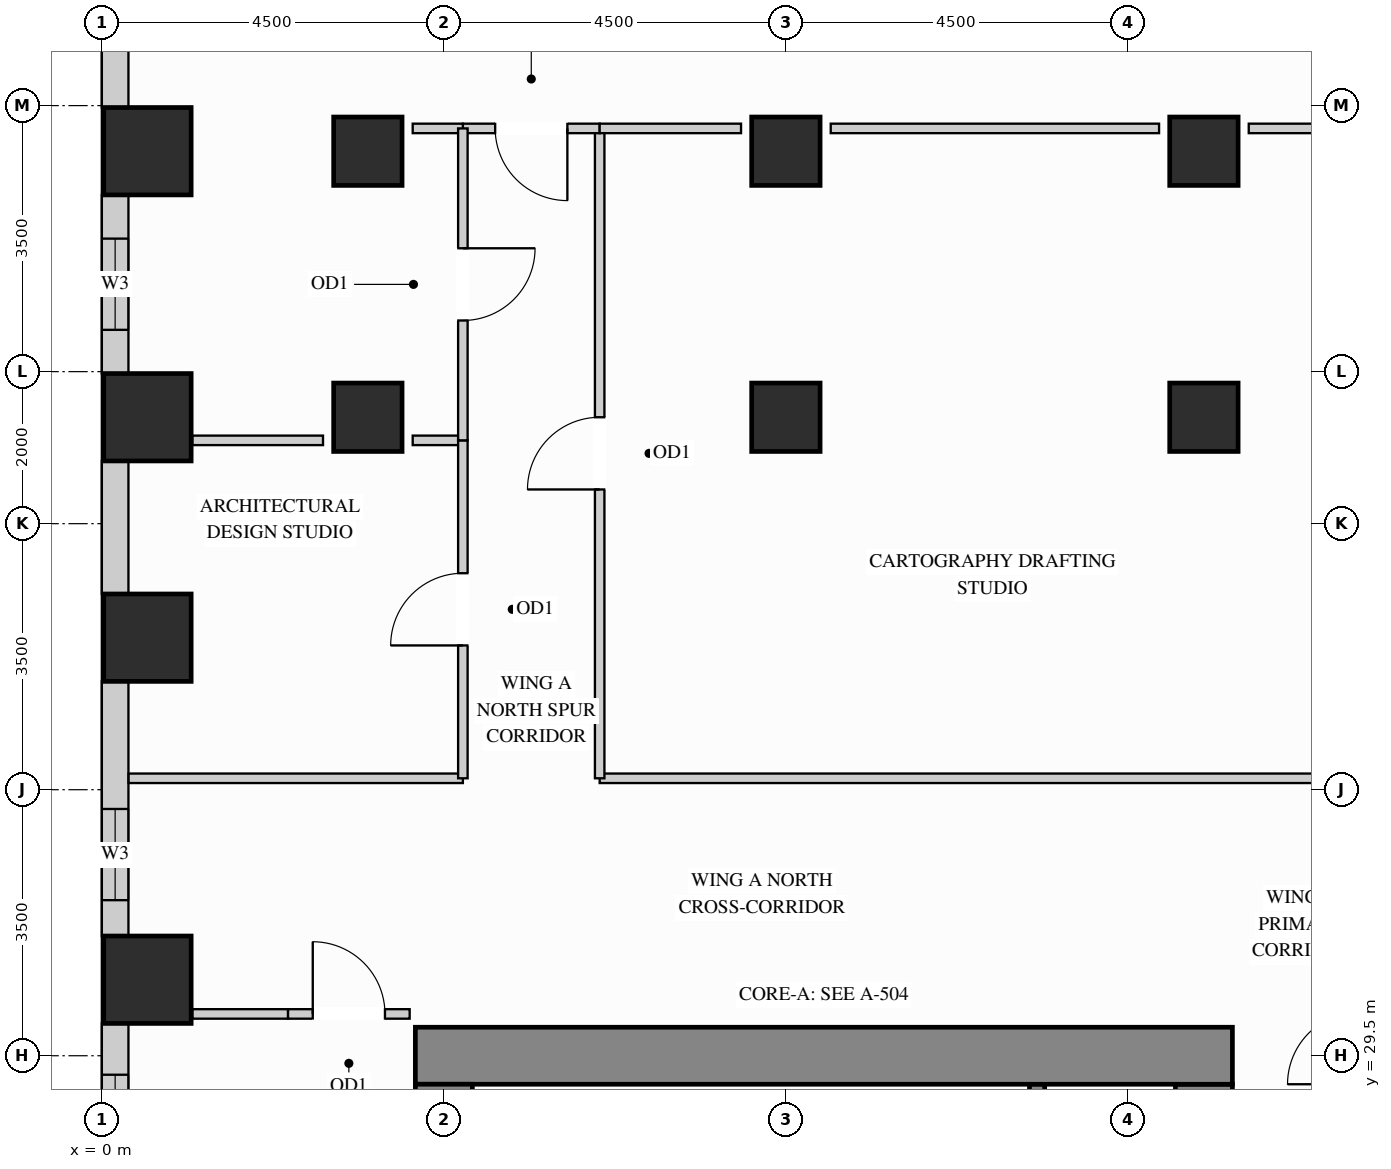
"""IFC4 building model, lengths in metres.
Left out: names, types, materials, properties, quantities, classifications, styles, units other than length and angle.
Written with IfcOpenShell. Run it as: python <this file> out.ifc"""

import sys

from ifc_helpers import new_model, si_unit, direction, frame, frame_2d, origin, origin_2d, place, context, subcontext, project, spatial, rectangle, extrude, source, transform, mapped, element, fill, save


model = new_model("IFC4")
c1 = context("Model", 3, precision=1e-05, world=origin(), true_north=direction((0.0, 1.0)))
c2 = subcontext(c1, "Body", "Model", "MODEL_VIEW")
j1 = project(units=[si_unit("LENGTHUNIT", "METRE"), si_unit("PLANEANGLEUNIT", "RADIAN")], contexts=[c1])
p1 = place(None, origin())
s1 = spatial("IfcSite", under=j1, at=p1, CompositionType="ELEMENT")
p2 = place(p1, origin())
s2 = spatial("IfcBuilding", under=s1, at=p2, CompositionType="ELEMENT")
p3 = place(p2, frame((0.0, 0.0, 109.8)))
s3 = spatial("IfcBuildingStorey", under=s2, at=p3, CompositionType="ELEMENT", Elevation=109.8)
m1 = source(origin(), c2, "Body", "SweptSolid", [
    extrude(rectangle(XDim=0.9, YDim=0.9, at=origin_2d()), origin(), (0.0, 0.0, 1.0), 3.38),
])
for number, where, z_axis, x_axis in (
    (1, (14.5, 37.9, 0.0), (0.0, 0.0, 1.0), (1.0, 0.0, 0.0)),
    (2, (14.5, 41.4, 0.0), (0.0, 0.0, 1.0), (1.0, 0.0, 0.0)),
    (3, (3.5, 37.9, 0.0), (0.0, 0.0, 1.0), (1.0, 0.0, 0.0)),
    (4, (3.5, 41.4, 0.0), (0.0, 0.0, 1.0), (1.0, 0.0, 0.0)),
    (5, (9.0, 37.9, 0.0), (0.0, 0.0, 1.0), (1.0, 0.0, 0.0)),
    (6, (9.0, 41.4, 0.0), (0.0, 0.0, 1.0), (1.0, 0.0, 0.0)),
):
    element("IfcColumn", number, at=place(p3, frame(where, z_axis=z_axis, x_axis=x_axis)), inside=s3, PredefinedType="COLUMN", context=c2, shape_type="MappedRepresentation", body=[
        mapped(m1, transform((0.0, 0.0, 0.0), x_axis=(1.0, 0.0, 0.0), y_axis=(0.0, 1.0, 0.0), z_axis=(0.0, 0.0, 1.0))),
    ])
m2 = source(origin(), c2, "Body", "SweptSolid", [
    extrude(rectangle(XDim=1.15, YDim=1.15, at=origin_2d()), origin(), (0.0, 0.0, 1.0), 3.38),
])
for number, where, z_axis, x_axis in (
    (7, (0.6, 30.5, 0.0), (0.0, 0.0, 1.0), (1.0, 0.0, 0.0)),
    (8, (0.6, 35.0, 0.0), (0.0, 0.0, 1.0), (1.0, 0.0, 0.0)),
    (9, (0.6, 37.9, 0.0), (0.0, 0.0, 1.0), (1.0, 0.0, 0.0)),
    (10, (0.6, 41.4, 0.0), (0.0, 0.0, 1.0), (1.0, 0.0, 0.0)),
):
    element("IfcColumn", number, at=place(p3, frame(where, z_axis=z_axis, x_axis=x_axis)), inside=s3, PredefinedType="COLUMN", context=c2, shape_type="MappedRepresentation", body=[
        mapped(m2, transform((0.0, 0.0, 0.0), x_axis=(1.0, 0.0, 0.0), y_axis=(0.0, 1.0, 0.0), z_axis=(0.0, 0.0, 1.0))),
    ])
m3 = source(origin(), c2, "Body", "SweptSolid", [
    extrude(rectangle(XDim=8.245, YDim=0.75, at=frame_2d((4.123, 0.0))), origin(), (0.0, 0.0, 1.0), 3.38),
])
p4 = place(p3, frame((14.5, 20.88, 0.0), z_axis=(0.0, 0.0, 1.0), x_axis=(0.0, 1.0, 0.0)))
e11 = element("IfcWall", 11, at=p4, inside=s3, PredefinedType="SHEAR", context=c2, shape_type="MappedRepresentation", body=[
    mapped(m3, transform((0.0, 0.0, 0.0), x_axis=(1.0, 0.0, 0.0), y_axis=(0.0, 1.0, 0.0), z_axis=(0.0, 0.0, 1.0))),
])
m4 = source(origin(), c2, "Body", "SweptSolid", [
    extrude(rectangle(XDim=10.75, YDim=0.75, at=frame_2d((5.375, 0.0))), origin(), (0.0, 0.0, 1.0), 3.38),
])
p5 = place(p3, frame((4.125, 29.5, 0.0), z_axis=(0.0, 0.0, 1.0), x_axis=(1.0, 0.0, 0.0)))
e12 = element("IfcWall", 12, at=p5, inside=s3, PredefinedType="SHEAR", context=c2, shape_type="MappedRepresentation", body=[
    mapped(m4, transform((0.0, 0.0, 0.0), x_axis=(1.0, 0.0, 0.0), y_axis=(0.0, 1.0, 0.0), z_axis=(0.0, 0.0, 1.0))),
])
m5 = source(origin(), c2, "Body", "SweptSolid", [
    extrude(rectangle(XDim=20.25, YDim=0.75, at=frame_2d((10.125, 0.0))), origin(), (0.0, 0.0, 1.0), 3.38),
])
p6 = place(p3, frame((4.5, 8.875, 0.0), z_axis=(0.0, 0.0, 1.0), x_axis=(0.0, 1.0, 0.0)))
e13 = element("IfcWall", 13, at=p6, inside=s3, PredefinedType="SHEAR", context=c2, shape_type="MappedRepresentation", body=[
    mapped(m5, transform((0.0, 0.0, 0.0), x_axis=(1.0, 0.0, 0.0), y_axis=(0.0, 1.0, 0.0), z_axis=(0.0, 0.0, 1.0))),
])
m6 = source(origin(), c2, "Body", "SweptSolid", [
    extrude(rectangle(XDim=1.179, YDim=0.35, at=frame_2d((0.59, 0.0))), origin(), (0.0, 0.0, 1.0), 3.365),
])
p7 = place(p3, frame((0.175, 43.152, 0.0), z_axis=(0.0, 0.0, 1.0), x_axis=(0.0, -1.0, 0.0)))
e14 = element("IfcWall", 14, at=p7, inside=s3, PredefinedType="SOLIDWALL", context=c2, shape_type="MappedRepresentation", body=[
    mapped(m6, transform((0.0, 0.0, 0.0), x_axis=(1.0, 0.0, 0.0), y_axis=(0.0, 1.0, 0.0), z_axis=(0.0, 0.0, 1.0))),
])
p8 = place(p3, frame((0.175, 40.827, 0.0), z_axis=(0.0, 0.0, 1.0), x_axis=(0.0, -1.0, 0.0)))
e15 = element("IfcWall", 15, at=p8, inside=s3, PredefinedType="SOLIDWALL", context=c2, shape_type="SweptSolid", body=[
    extrude(rectangle(XDim=2.354, YDim=0.35, at=frame_2d((1.177, 0.0))), origin(), (0.0, 0.0, 1.0), 3.365),
])
p9 = place(p8, frame((0.577, 0.0, 0.78)))
e16 = element("IfcOpeningElement", 16, at=p9, cuts=e15, PredefinedType="OPENING", context=c2, shape_type="SweptSolid", body=[
    extrude(rectangle(XDim=1.2, YDim=2.1, at=frame_2d((0.6, 1.05))), frame((0.0, 0.185, 0.0), z_axis=(0.0, -1.0, 0.0), x_axis=(1.0, 0.0, 0.0)), (0.0, 0.0, 1.0), 0.37),
])
m7 = source(origin(), c2, "Body", "SweptSolid", [
    extrude(rectangle(XDim=1.754, YDim=0.35, at=frame_2d((0.877, 0.0))), origin(), (0.0, 0.0, 1.0), 3.365),
])
p10 = place(p3, frame((0.175, 37.327, 0.0), z_axis=(0.0, 0.0, 1.0), x_axis=(0.0, -1.0, 0.0)))
e17 = element("IfcWall", 17, at=p10, inside=s3, PredefinedType="SOLIDWALL", context=c2, shape_type="MappedRepresentation", body=[
    mapped(m7, transform((0.0, 0.0, 0.0), x_axis=(1.0, 0.0, 0.0), y_axis=(0.0, 1.0, 0.0), z_axis=(0.0, 0.0, 1.0))),
])
p11 = place(p3, frame((0.175, 34.427, 0.0), z_axis=(0.0, 0.0, 1.0), x_axis=(0.0, -1.0, 0.0)))
e18 = element("IfcWall", 18, at=p11, inside=s3, PredefinedType="SOLIDWALL", context=c2, shape_type="SweptSolid", body=[
    extrude(rectangle(XDim=3.354, YDim=0.35, at=frame_2d((1.677, 0.0))), origin(), (0.0, 0.0, 1.0), 3.365),
])
p12 = place(p11, frame((1.68, 0.0, 0.78)))
e19 = element("IfcOpeningElement", 19, at=p12, cuts=e18, PredefinedType="OPENING", context=c2, shape_type="SweptSolid", body=[
    extrude(rectangle(XDim=1.2, YDim=2.1, at=frame_2d((0.6, 1.05))), frame((0.0, 0.185, 0.0), z_axis=(0.0, -1.0, 0.0), x_axis=(1.0, 0.0, 0.0)), (0.0, 0.0, 1.0), 0.37),
])
p13 = place(p3, frame((0.175, 29.927, 0.0), z_axis=(0.0, 0.0, 1.0), x_axis=(0.0, -1.0, 0.0)))
e20 = element("IfcWall", 20, at=p13, inside=s3, PredefinedType="SOLIDWALL", context=c2, shape_type="SweptSolid", body=[
    extrude(rectangle(XDim=2.554, YDim=0.35, at=frame_2d((1.277, 0.0))), origin(), (0.0, 0.0, 1.0), 3.365),
])
p14 = place(p13, frame((0.677, 0.0, 0.78)))
e21 = element("IfcOpeningElement", 21, at=p14, cuts=e20, PredefinedType="OPENING", context=c2, shape_type="SweptSolid", body=[
    extrude(rectangle(XDim=1.2, YDim=2.1, at=frame_2d((0.6, 1.05))), frame((0.0, 0.185, 0.0), z_axis=(0.0, -1.0, 0.0), x_axis=(1.0, 0.0, 0.0)), (0.0, 0.0, 1.0), 0.37),
])
m8 = source(origin(), c2, "Body", "SweptSolid", [
    extrude(rectangle(XDim=12.598, YDim=0.125, at=frame_2d((6.299, 0.0))), origin(), (0.0, 0.0, 1.0), 3.365),
])
p15 = place(p3, frame((6.55, 33.15, 0.0), z_axis=(0.0, 0.0, 1.0), x_axis=(1.0, 0.0, 0.0)))
e22 = element("IfcWall", 22, at=p15, inside=s3, PredefinedType="PARTITIONING", context=c2, shape_type="MappedRepresentation", body=[
    mapped(m8, transform((0.0, 0.0, 0.0), x_axis=(1.0, 0.0, 0.0), y_axis=(0.0, 1.0, 0.0), z_axis=(0.0, 0.0, 1.0))),
])
m9 = source(origin(), c2, "Body", "SweptSolid", [
    extrude(rectangle(XDim=4.398, YDim=0.125, at=frame_2d((2.199, 0.0))), origin(), (0.0, 0.0, 1.0), 3.365),
])
p16 = place(p3, frame((0.352, 33.15, 0.0), z_axis=(0.0, 0.0, 1.0), x_axis=(1.0, 0.0, 0.0)))
e23 = element("IfcWall", 23, at=p16, inside=s3, PredefinedType="PARTITIONING", context=c2, shape_type="MappedRepresentation", body=[
    mapped(m9, transform((0.0, 0.0, 0.0), x_axis=(1.0, 0.0, 0.0), y_axis=(0.0, 1.0, 0.0), z_axis=(0.0, 0.0, 1.0))),
])
m10 = source(origin(), c2, "Body", "SweptSolid", [
    extrude(rectangle(XDim=1.72, YDim=0.125, at=frame_2d((0.86, 0.0))), origin(), (0.0, 0.0, 1.0), 3.365),
])
p17 = place(p3, frame((1.19, 37.596, 0.0), z_axis=(0.0, 0.0, 1.0), x_axis=(1.0, 0.0, 0.0)))
e24 = element("IfcWall", 24, at=p17, inside=s3, PredefinedType="PARTITIONING", context=c2, shape_type="MappedRepresentation", body=[
    mapped(m10, transform((0.0, 0.0, 0.0), x_axis=(1.0, 0.0, 0.0), y_axis=(0.0, 1.0, 0.0), z_axis=(0.0, 0.0, 1.0))),
])
m11 = source(origin(), c2, "Body", "SweptSolid", [
    extrude(rectangle(XDim=0.66, YDim=0.125, at=frame_2d((0.33, 0.0))), origin(), (0.0, 0.0, 1.0), 3.365),
])
p18 = place(p3, frame((4.09, 37.596, 0.0), z_axis=(0.0, 0.0, 1.0), x_axis=(1.0, 0.0, 0.0)))
e25 = element("IfcWall", 25, at=p18, inside=s3, PredefinedType="PARTITIONING", context=c2, shape_type="MappedRepresentation", body=[
    mapped(m11, transform((0.0, 0.0, 0.0), x_axis=(1.0, 0.0, 0.0), y_axis=(0.0, 1.0, 0.0), z_axis=(0.0, 0.0, 1.0))),
])
m12 = source(origin(), c2, "Body", "SweptSolid", [
    extrude(rectangle(XDim=1.26, YDim=0.125, at=frame_2d((0.63, 0.0))), origin(), (0.0, 0.0, 1.0), 3.365),
])
p19 = place(p3, frame((1.19, 30.05, 0.0), z_axis=(0.0, 0.0, 1.0), x_axis=(1.0, 0.0, 0.0)))
e26 = element("IfcWall", 26, at=p19, inside=s3, PredefinedType="PARTITIONING", context=c2, shape_type="MappedRepresentation", body=[
    mapped(m12, transform((0.0, 0.0, 0.0), x_axis=(1.0, 0.0, 0.0), y_axis=(0.0, 1.0, 0.0), z_axis=(0.0, 0.0, 1.0))),
])
p20 = place(p3, frame((2.45, 30.05, 0.0), z_axis=(0.0, 0.0, 1.0), x_axis=(1.0, 0.0, 0.0)))
e27 = element("IfcWall", 27, at=p20, inside=s3, PredefinedType="PARTITIONING", context=c2, shape_type="SweptSolid", body=[
    extrude(rectangle(XDim=1.6, YDim=0.125, at=frame_2d((0.8, 0.0))), origin(), (0.0, 0.0, 1.0), 3.365),
])
p21 = place(p20, frame((0.325, 0.0, 0.0)))
e28 = element("IfcOpeningElement", 28, at=p21, cuts=e27, PredefinedType="OPENING", context=c2, shape_type="SweptSolid", body=[
    extrude(rectangle(XDim=0.95, YDim=2.15, at=frame_2d((0.475, 1.075))), frame((0.0, 0.073, 0.0), z_axis=(0.0, -1.0, 0.0), x_axis=(1.0, 0.0, 0.0)), (0.0, 0.0, 1.0), 0.145),
])
p22 = place(p3, frame((6.55, 33.15, 0.0), z_axis=(0.0, 0.0, 1.0), x_axis=(0.0, 1.0, 0.0)))
e29 = element("IfcWall", 29, at=p22, inside=s3, PredefinedType="PARTITIONING", context=c2, shape_type="SweptSolid", body=[
    extrude(rectangle(XDim=8.55, YDim=0.125, at=frame_2d((4.275, 0.0))), origin(), (0.0, 0.0, 1.0), 3.365),
])
p23 = place(p22, frame((3.8, 0.0, 0.0)))
e30 = element("IfcOpeningElement", 30, at=p23, cuts=e29, PredefinedType="OPENING", context=c2, shape_type="SweptSolid", body=[
    extrude(rectangle(XDim=0.95, YDim=2.15, at=frame_2d((0.475, 1.075))), frame((0.0, 0.073, 0.0), z_axis=(0.0, -1.0, 0.0), x_axis=(1.0, 0.0, 0.0)), (0.0, 0.0, 1.0), 0.145),
])
p24 = place(p3, frame((4.75, 41.7, 0.0), z_axis=(0.0, 0.0, 1.0), x_axis=(1.0, 0.0, 0.0)))
e31 = element("IfcWall", 31, at=p24, inside=s3, PredefinedType="PARTITIONING", context=c2, shape_type="SweptSolid", body=[
    extrude(rectangle(XDim=1.8, YDim=0.125, at=frame_2d((0.9, 0.0))), origin(), (0.0, 0.0, 1.0), 3.365),
])
p25 = place(p24, frame((0.425, 0.0, 0.0)))
e32 = element("IfcOpeningElement", 32, at=p25, cuts=e31, PredefinedType="OPENING", context=c2, shape_type="SweptSolid", body=[
    extrude(rectangle(XDim=0.95, YDim=2.15, at=frame_2d((0.475, 1.075))), frame((0.0, 0.073, 0.0), z_axis=(0.0, -1.0, 0.0), x_axis=(1.0, 0.0, 0.0)), (0.0, 0.0, 1.0), 0.145),
])
m13 = source(origin(), c2, "Body", "SweptSolid", [
    extrude(rectangle(XDim=1.86, YDim=0.125, at=frame_2d((0.93, 0.0))), origin(), (0.0, 0.0, 1.0), 3.365),
])
p26 = place(p3, frame((6.55, 41.7, 0.0), z_axis=(0.0, 0.0, 1.0), x_axis=(1.0, 0.0, 0.0)))
e33 = element("IfcWall", 33, at=p26, inside=s3, PredefinedType="PARTITIONING", context=c2, shape_type="MappedRepresentation", body=[
    mapped(m13, transform((0.0, 0.0, 0.0), x_axis=(1.0, 0.0, 0.0), y_axis=(0.0, 1.0, 0.0), z_axis=(0.0, 0.0, 1.0))),
])
m14 = source(origin(), c2, "Body", "SweptSolid", [
    extrude(rectangle(XDim=4.32, YDim=0.125, at=frame_2d((2.16, 0.0))), origin(), (0.0, 0.0, 1.0), 3.365),
])
p27 = place(p3, frame((9.59, 41.7, 0.0), z_axis=(0.0, 0.0, 1.0), x_axis=(1.0, 0.0, 0.0)))
e34 = element("IfcWall", 34, at=p27, inside=s3, PredefinedType="PARTITIONING", context=c2, shape_type="MappedRepresentation", body=[
    mapped(m14, transform((0.0, 0.0, 0.0), x_axis=(1.0, 0.0, 0.0), y_axis=(0.0, 1.0, 0.0), z_axis=(0.0, 0.0, 1.0))),
])
m15 = source(origin(), c2, "Body", "SweptSolid", [
    extrude(rectangle(XDim=1.81, YDim=0.125, at=frame_2d((0.905, 0.0))), origin(), (0.0, 0.0, 1.0), 3.365),
])
p28 = place(p3, frame((15.09, 41.7, 0.0), z_axis=(0.0, 0.0, 1.0), x_axis=(1.0, 0.0, 0.0)))
e35 = element("IfcWall", 35, at=p28, inside=s3, PredefinedType="PARTITIONING", context=c2, shape_type="MappedRepresentation", body=[
    mapped(m15, transform((0.0, 0.0, 0.0), x_axis=(1.0, 0.0, 0.0), y_axis=(0.0, 1.0, 0.0), z_axis=(0.0, 0.0, 1.0))),
])
p29 = place(p3, frame((4.09, 41.7, 0.0), z_axis=(0.0, 0.0, 1.0), x_axis=(1.0, 0.0, 0.0)))
e36 = element("IfcWall", 36, at=p29, inside=s3, PredefinedType="PARTITIONING", context=c2, shape_type="MappedRepresentation", body=[
    mapped(m11, transform((0.0, 0.0, 0.0), x_axis=(1.0, 0.0, 0.0), y_axis=(0.0, 1.0, 0.0), z_axis=(0.0, 0.0, 1.0))),
])
p30 = place(p3, frame((4.75, 33.15, 0.0), z_axis=(0.0, 0.0, 1.0), x_axis=(0.0, 1.0, 0.0)))
e37 = element("IfcWall", 37, at=p30, inside=s3, PredefinedType="PARTITIONING", context=c2, shape_type="SweptSolid", body=[
    extrude(rectangle(XDim=4.446, YDim=0.125, at=frame_2d((2.223, 0.0))), origin(), (0.0, 0.0, 1.0), 3.365),
])
p31 = place(p30, frame((1.748, 0.0, 0.0)))
e38 = element("IfcOpeningElement", 38, at=p31, cuts=e37, PredefinedType="OPENING", context=c2, shape_type="SweptSolid", body=[
    extrude(rectangle(XDim=0.95, YDim=2.15, at=frame_2d((0.475, 1.075))), frame((0.0, 0.073, 0.0), z_axis=(0.0, -1.0, 0.0), x_axis=(1.0, 0.0, 0.0)), (0.0, 0.0, 1.0), 0.145),
])
p32 = place(p3, frame((4.75, 37.596, 0.0), z_axis=(0.0, 0.0, 1.0), x_axis=(0.0, 1.0, 0.0)))
e39 = element("IfcWall", 39, at=p32, inside=s3, PredefinedType="PARTITIONING", context=c2, shape_type="SweptSolid", body=[
    extrude(rectangle(XDim=4.104, YDim=0.125, at=frame_2d((2.052, 0.0))), origin(), (0.0, 0.0, 1.0), 3.365),
])
p33 = place(p32, frame((1.577, 0.0, 0.0)))
e40 = element("IfcOpeningElement", 40, at=p33, cuts=e39, PredefinedType="OPENING", context=c2, shape_type="SweptSolid", body=[
    extrude(rectangle(XDim=0.95, YDim=2.15, at=frame_2d((0.475, 1.075))), frame((0.0, 0.073, 0.0), z_axis=(0.0, -1.0, 0.0), x_axis=(1.0, 0.0, 0.0)), (0.0, 0.0, 1.0), 0.145),
])
m16 = source(origin(), c2, "Body", "SweptSolid", [
    extrude(rectangle(XDim=3.678, YDim=0.2, at=frame_2d((1.839, 0.0))), origin(), (0.0, 0.0, 1.0), 3.38),
])
p34 = place(p3, frame((12.305, 25.445, 0.0), z_axis=(0.0, 0.0, 1.0), x_axis=(0.0, 1.0, 0.0)))
e41 = element("IfcWall", 41, at=p34, inside=s3, PredefinedType="SHEAR", context=c2, shape_type="MappedRepresentation", body=[
    mapped(m16, transform((0.0, 0.0, 0.0), x_axis=(1.0, 0.0, 0.0), y_axis=(0.0, 1.0, 0.0), z_axis=(0.0, 0.0, 1.0))),
])
m17 = source(origin(), c2, "Body", "SweptSolid", [
    extrude(rectangle(XDim=0.95, YDim=2.15, at=frame_2d((0.475, 1.075))), frame((0.0, 0.025, 0.0), z_axis=(0.0, -1.0, 0.0), x_axis=(1.0, 0.0, 0.0)), (0.0, 0.0, 1.0), 0.05),
])
p35 = place(p23, origin())
e42 = element("IfcDoor", 42, at=p35, inside=s3, OperationType="SINGLE_SWING_LEFT", PredefinedType="DOOR", context=c2, shape_type="MappedRepresentation", body=[
    mapped(m17, transform((0.0, 0.0, 0.0), x_axis=(1.0, 0.0, 0.0), y_axis=(0.0, 1.0, 0.0), z_axis=(0.0, 0.0, 1.0))),
])
fill(e30, e42)
p36 = place(p25, origin())
e43 = element("IfcDoor", 43, at=p36, inside=s3, OperationType="SINGLE_SWING_RIGHT", PredefinedType="DOOR", context=c2, shape_type="MappedRepresentation", body=[
    mapped(m17, transform((0.0, 0.0, 0.0), x_axis=(1.0, 0.0, 0.0), y_axis=(0.0, 1.0, 0.0), z_axis=(0.0, 0.0, 1.0))),
])
fill(e32, e43)
p37 = place(p31, origin())
e44 = element("IfcDoor", 44, at=p37, inside=s3, OperationType="SINGLE_SWING_LEFT", PredefinedType="DOOR", context=c2, shape_type="MappedRepresentation", body=[
    mapped(m17, transform((0.0, 0.0, 0.0), x_axis=(1.0, 0.0, 0.0), y_axis=(0.0, 1.0, 0.0), z_axis=(0.0, 0.0, 1.0))),
])
fill(e38, e44)
p38 = place(p33, origin())
e45 = element("IfcDoor", 45, at=p38, inside=s3, OperationType="SINGLE_SWING_RIGHT", PredefinedType="DOOR", context=c2, shape_type="MappedRepresentation", body=[
    mapped(m17, transform((0.0, 0.0, 0.0), x_axis=(1.0, 0.0, 0.0), y_axis=(0.0, 1.0, 0.0), z_axis=(0.0, 0.0, 1.0))),
])
fill(e40, e45)
p39 = place(p21, origin())
e46 = element("IfcDoor", 46, at=p39, inside=s3, OperationType="SINGLE_SWING_LEFT", PredefinedType="DOOR", context=c2, shape_type="MappedRepresentation", body=[
    mapped(m17, transform((0.0, 0.0, 0.0), x_axis=(1.0, 0.0, 0.0), y_axis=(0.0, 1.0, 0.0), z_axis=(0.0, 0.0, 1.0))),
])
fill(e28, e46)
m18 = source(origin(), c2, "Body", "SweptSolid", [
    extrude(rectangle(XDim=1.2, YDim=2.1, at=frame_2d((0.6, 1.05))), frame((0.0, 0.03, 0.0), z_axis=(0.0, -1.0, 0.0), x_axis=(1.0, 0.0, 0.0)), (0.0, 0.0, 1.0), 0.06),
])
p40 = place(p9, origin())
e47 = element("IfcWindow", 47, at=p40, inside=s3, PartitioningType="SINGLE_PANEL", PredefinedType="WINDOW", context=c2, shape_type="MappedRepresentation", body=[
    mapped(m18, transform((0.0, 0.0, 0.0), x_axis=(1.0, 0.0, 0.0), y_axis=(0.0, 1.0, 0.0), z_axis=(0.0, 0.0, 1.0))),
])
fill(e16, e47)
p41 = place(p12, origin())
e48 = element("IfcWindow", 48, at=p41, inside=s3, PartitioningType="SINGLE_PANEL", PredefinedType="WINDOW", context=c2, shape_type="MappedRepresentation", body=[
    mapped(m18, transform((0.0, 0.0, 0.0), x_axis=(1.0, 0.0, 0.0), y_axis=(0.0, 1.0, 0.0), z_axis=(0.0, 0.0, 1.0))),
])
fill(e19, e48)
p42 = place(p14, origin())
e49 = element("IfcWindow", 49, at=p42, inside=s3, PartitioningType="SINGLE_PANEL", PredefinedType="WINDOW", context=c2, shape_type="MappedRepresentation", body=[
    mapped(m18, transform((0.0, 0.0, 0.0), x_axis=(1.0, 0.0, 0.0), y_axis=(0.0, 1.0, 0.0), z_axis=(0.0, 0.0, 1.0))),
])
fill(e21, e49)
save(model, sys.argv[1])
